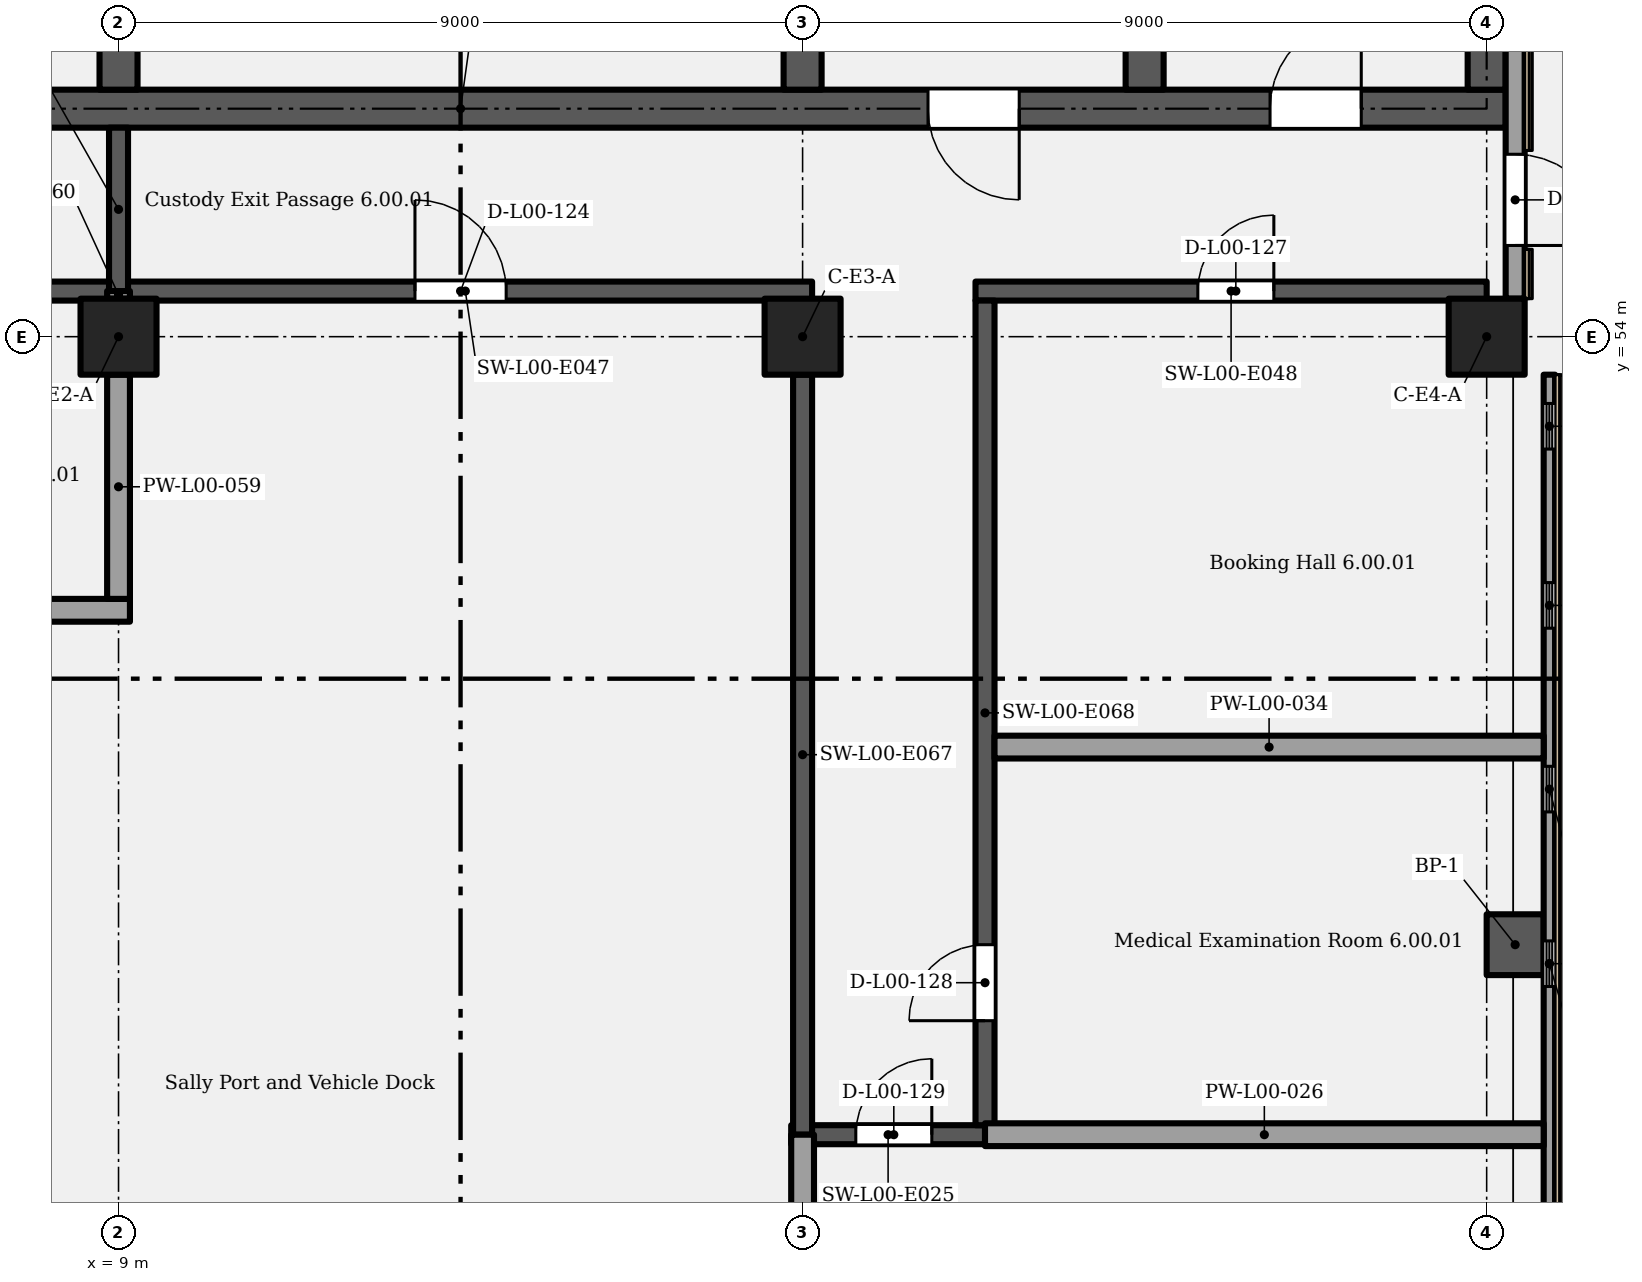
"""IFC4 building model, lengths in metres.
Left out: names, types, materials, properties, quantities, classifications, styles, units other than length and angle.
Written with IfcOpenShell. Run it as: python <this file> out.ifc"""

import sys

from ifc_helpers import new_model, si_unit, direction, frame, frame_2d, origin, origin_2d, place, context, subcontext, project, spatial, rectangle, extrude, element, fill, save


model = new_model("IFC4")
c1 = context("Model", 3, precision=1e-05, world=origin(), true_north=direction((0.0, 1.0)))
c2 = subcontext(c1, "Body", "Model", "MODEL_VIEW")
j1 = project(units=[si_unit("LENGTHUNIT", "METRE"), si_unit("PLANEANGLEUNIT", "RADIAN")], contexts=[c1])
p1 = place(None, origin())
s1 = spatial("IfcSite", under=j1, at=p1, CompositionType="ELEMENT")
p2 = place(p1, origin())
s2 = spatial("IfcBuilding", under=s1, at=p2, CompositionType="ELEMENT")
p3 = place(p2, origin())
s3 = spatial("IfcBuildingStorey", under=s2, at=p3, CompositionType="ELEMENT", Elevation=0.0)
for number, where, z_axis, x_axis in (
    (1, (9.0, 54.0, 0.0), (0.0, 0.0, 1.0), (1.0, 0.0, 0.0)),
    (2, (18.0, 54.0, 0.0), (0.0, 0.0, 1.0), (1.0, 0.0, 0.0)),
    (3, (27.0, 54.0, 0.0), (0.0, 0.0, 1.0), (1.0, 0.0, 0.0)),
):
    element("IfcColumn", number, at=place(p3, frame(where, z_axis=z_axis, x_axis=x_axis)), inside=s3, PredefinedType="COLUMN", context=c2, shape_type="SweptSolid", body=[
        extrude(rectangle(XDim=1.0, YDim=1.0, at=origin_2d()), origin(), (0.0, 0.0, 1.0), 6.6),
    ])
p4 = place(p3, frame((-0.25, 57.0, 0.0), z_axis=(0.0, 0.0, 1.0), x_axis=(1.0, 0.0, 0.0)))
e4 = element("IfcWall", 4, at=p4, inside=s3, PredefinedType="SHEAR", context=c2, shape_type="SweptSolid", body=[
    extrude(rectangle(XDim=27.5, YDim=0.5, at=frame_2d((13.75, 0.0))), origin(), (0.0, 0.0, 1.0), 6.3),
])
p5 = place(p4, frame((1.9, 0.0, 0.0)))
e5 = element("IfcOpeningElement", 5, at=p5, cuts=e4, PredefinedType="OPENING", context=c2, shape_type="SweptSolid", body=[
    extrude(rectangle(XDim=1.2, YDim=2.1, at=frame_2d((0.6, 1.05))), frame((0.0, 0.26, 0.0), z_axis=(0.0, -1.0, 0.0), x_axis=(1.0, 0.0, 0.0)), (0.0, 0.0, 1.0), 0.52),
])
p6 = place(p4, frame((7.6, 0.0, 0.0), z_axis=(0.0, 0.0, 1.0), x_axis=(-1.0, 0.0, 0.0)))
e6 = element("IfcOpeningElement", 6, at=p6, cuts=e4, PredefinedType="OPENING", context=c2, shape_type="SweptSolid", body=[
    extrude(rectangle(XDim=1.2, YDim=2.1, at=frame_2d((0.6, 1.05))), frame((0.0, 0.26, 0.0), z_axis=(0.0, -1.0, 0.0), x_axis=(1.0, 0.0, 0.0)), (0.0, 0.0, 1.0), 0.52),
])
p7 = place(p4, frame((21.1, 0.0, 0.0), z_axis=(0.0, 0.0, 1.0), x_axis=(-1.0, 0.0, 0.0)))
e7 = element("IfcOpeningElement", 7, at=p7, cuts=e4, PredefinedType="OPENING", context=c2, shape_type="SweptSolid", body=[
    extrude(rectangle(XDim=1.2, YDim=2.1, at=frame_2d((0.6, 1.05))), frame((0.0, 0.26, 0.0), z_axis=(0.0, -1.0, 0.0), x_axis=(1.0, 0.0, 0.0)), (0.0, 0.0, 1.0), 0.52),
])
p8 = place(p4, frame((24.4, 0.0, 0.0)))
e8 = element("IfcOpeningElement", 8, at=p8, cuts=e4, PredefinedType="OPENING", context=c2, shape_type="SweptSolid", body=[
    extrude(rectangle(XDim=1.2, YDim=2.1, at=frame_2d((0.6, 1.05))), frame((0.0, 0.26, 0.0), z_axis=(0.0, -1.0, 0.0), x_axis=(1.0, 0.0, 0.0)), (0.0, 0.0, 1.0), 0.52),
])
for number, where, z_axis, x_axis in (
    (9, (9.0, 57.25, 0.0), (0.0, 0.0, 1.0), (0.0, 1.0, 0.0)),
    (10, (18.0, 57.25, 0.0), (0.0, 0.0, 1.0), (0.0, 1.0, 0.0)),
):
    element("IfcWall", number, at=place(p3, frame(where, z_axis=z_axis, x_axis=x_axis)), inside=s3, PredefinedType="SHEAR", context=c2, shape_type="SweptSolid", body=[
        extrude(rectangle(XDim=8.3, YDim=0.5, at=frame_2d((4.15, 0.0))), origin(), (0.0, 0.0, 1.0), 6.3),
    ])
p9 = place(p3, frame((22.5, 57.25, 0.0), z_axis=(0.0, 0.0, 1.0), x_axis=(0.0, 1.0, 0.0)))
e11 = element("IfcWall", 11, at=p9, inside=s3, PredefinedType="SHEAR", context=c2, shape_type="SweptSolid", body=[
    extrude(rectangle(XDim=8.5, YDim=0.5, at=frame_2d((4.25, 0.0))), origin(), (0.0, 0.0, 1.0), 6.3),
])
p10 = place(p9, frame((1.85, 0.0, 0.0), z_axis=(0.0, 0.0, 1.0), x_axis=(-1.0, 0.0, 0.0)))
e12 = element("IfcOpeningElement", 12, at=p10, cuts=e11, PredefinedType="OPENING", context=c2, shape_type="SweptSolid", body=[
    extrude(rectangle(XDim=1.2, YDim=2.1, at=frame_2d((0.6, 1.05))), frame((0.0, 0.26, 0.0), z_axis=(0.0, -1.0, 0.0), x_axis=(1.0, 0.0, 0.0)), (0.0, 0.0, 1.0), 0.52),
])
p11 = place(p3, frame((27.0, 57.25, 0.0), z_axis=(0.0, 0.0, 1.0), x_axis=(0.0, 1.0, 0.0)))
e13 = element("IfcWall", 13, at=p11, inside=s3, PredefinedType="SHEAR", context=c2, shape_type="SweptSolid", body=[
    extrude(rectangle(XDim=8.3, YDim=0.5, at=frame_2d((4.15, 0.0))), origin(), (0.0, 0.0, 1.0), 6.3),
])
p12 = place(p3, frame((27.375, 45.6, 0.0), z_axis=(0.0, 0.0, 1.0), x_axis=(0.0, 1.0, 0.0)))
e14 = element("IfcWall", 14, at=p12, inside=s3, PredefinedType="SOLIDWALL", context=c2, shape_type="SweptSolid", body=[
    extrude(rectangle(XDim=0.8, YDim=0.75, at=frame_2d((0.4, 0.0))), origin(), (0.0, 0.0, 1.0), 5.8),
])
p13 = place(p3, frame((27.825, 38.0, 0.0), z_axis=(0.0, 0.0, 1.0), x_axis=(0.0, 1.0, 0.0)))
e15 = element("IfcWall", 15, at=p13, inside=s3, PredefinedType="SOLIDWALL", context=c2, shape_type="SweptSolid", body=[
    extrude(rectangle(XDim=15.5, YDim=0.15, at=frame_2d((7.75, 0.0))), origin(), (0.0, 0.0, 1.0), 6.4),
])
p14 = place(p13, frame((0.379, 0.0, 1.5)))
e16 = element("IfcOpeningElement", 16, at=p14, cuts=e15, PredefinedType="OPENING", context=c2, shape_type="SweptSolid", body=[
    extrude(rectangle(XDim=0.6, YDim=3.0, at=frame_2d((0.3, 1.5))), frame((0.0, 0.085, 0.0), z_axis=(0.0, -1.0, 0.0), x_axis=(1.0, 0.0, 0.0)), (0.0, 0.0, 1.0), 0.17),
])
p15 = place(p13, frame((2.736, 0.0, 1.5)))
e17 = element("IfcOpeningElement", 17, at=p15, cuts=e15, PredefinedType="OPENING", context=c2, shape_type="SweptSolid", body=[
    extrude(rectangle(XDim=0.6, YDim=3.0, at=frame_2d((0.3, 1.5))), frame((0.0, 0.085, 0.0), z_axis=(0.0, -1.0, 0.0), x_axis=(1.0, 0.0, 0.0)), (0.0, 0.0, 1.0), 0.17),
])
p16 = place(p13, frame((7.45, 0.0, 1.5)))
e18 = element("IfcOpeningElement", 18, at=p16, cuts=e15, PredefinedType="OPENING", context=c2, shape_type="SweptSolid", body=[
    extrude(rectangle(XDim=0.6, YDim=3.0, at=frame_2d((0.3, 1.5))), frame((0.0, 0.085, 0.0), z_axis=(0.0, -1.0, 0.0), x_axis=(1.0, 0.0, 0.0)), (0.0, 0.0, 1.0), 0.17),
])
p17 = place(p13, frame((9.747, 0.0, 1.5)))
e19 = element("IfcOpeningElement", 19, at=p17, cuts=e15, PredefinedType="OPENING", context=c2, shape_type="SweptSolid", body=[
    extrude(rectangle(XDim=0.6, YDim=3.0, at=frame_2d((0.3, 1.5))), frame((0.0, 0.085, 0.0), z_axis=(0.0, -1.0, 0.0), x_axis=(1.0, 0.0, 0.0)), (0.0, 0.0, 1.0), 0.17),
])
p18 = place(p13, frame((12.164, 0.0, 1.5)))
e20 = element("IfcOpeningElement", 20, at=p18, cuts=e15, PredefinedType="OPENING", context=c2, shape_type="SweptSolid", body=[
    extrude(rectangle(XDim=0.6, YDim=3.0, at=frame_2d((0.3, 1.5))), frame((0.0, 0.085, 0.0), z_axis=(0.0, -1.0, 0.0), x_axis=(1.0, 0.0, 0.0)), (0.0, 0.0, 1.0), 0.17),
])
p19 = place(p13, frame((14.521, 0.0, 1.5)))
e21 = element("IfcOpeningElement", 21, at=p19, cuts=e15, PredefinedType="OPENING", context=c2, shape_type="SweptSolid", body=[
    extrude(rectangle(XDim=0.6, YDim=3.0, at=frame_2d((0.3, 1.5))), frame((0.0, 0.085, 0.0), z_axis=(0.0, -1.0, 0.0), x_axis=(1.0, 0.0, 0.0)), (0.0, 0.0, 1.0), 0.17),
])
p20 = place(p3, frame((27.375, 54.5, 0.0), z_axis=(0.0, 0.0, 1.0), x_axis=(0.0, 1.0, 0.0)))
e22 = element("IfcWall", 22, at=p20, inside=s3, PredefinedType="SOLIDWALL", context=c2, shape_type="SweptSolid", body=[
    extrude(rectangle(XDim=11.05, YDim=0.25, at=frame_2d((5.525, 0.0))), origin(), (0.0, 0.0, 1.0), 6.3),
])
p21 = place(p20, frame((1.9, 0.0, 0.0), z_axis=(0.0, 0.0, 1.0), x_axis=(-1.0, 0.0, 0.0)))
e23 = element("IfcOpeningElement", 23, at=p21, cuts=e22, PredefinedType="OPENING", context=c2, shape_type="SweptSolid", body=[
    extrude(rectangle(XDim=1.2, YDim=2.1, at=frame_2d((0.6, 1.05))), frame((0.0, 0.135, 0.0), z_axis=(0.0, -1.0, 0.0), x_axis=(1.0, 0.0, 0.0)), (0.0, 0.0, 1.0), 0.27),
])
p22 = place(p3, frame((17.85, 43.5, 0.0), z_axis=(0.0, 0.0, 1.0), x_axis=(1.0, 0.0, 0.0)))
e24 = element("IfcWall", 24, at=p22, inside=s3, PredefinedType="SHEAR", context=c2, shape_type="SweptSolid", body=[
    extrude(rectangle(XDim=2.55, YDim=0.25, at=frame_2d((1.275, 0.0))), origin(), (0.0, 0.0, 1.0), 6.3),
])
p23 = place(p22, frame((0.85, 0.0, 0.0)))
e25 = element("IfcOpeningElement", 25, at=p23, cuts=e24, PredefinedType="OPENING", context=c2, shape_type="SweptSolid", body=[
    extrude(rectangle(XDim=1.0, YDim=2.1, at=frame_2d((0.5, 1.05))), frame((0.0, 0.135, 0.0), z_axis=(0.0, -1.0, 0.0), x_axis=(1.0, 0.0, 0.0)), (0.0, 0.0, 1.0), 0.27),
])
p24 = place(p3, frame((20.4, 43.5, 0.0), z_axis=(0.0, 0.0, 1.0), x_axis=(1.0, 0.0, 0.0)))
e26 = element("IfcWall", 26, at=p24, inside=s3, PredefinedType="PARTITIONING", context=c2, shape_type="SweptSolid", body=[
    extrude(rectangle(XDim=7.35, YDim=0.3, at=frame_2d((3.675, 0.0))), origin(), (0.0, 0.0, 1.0), 6.3),
])
p25 = place(p3, frame((20.525, 48.6, 0.0), z_axis=(0.0, 0.0, 1.0), x_axis=(1.0, 0.0, 0.0)))
e27 = element("IfcWall", 27, at=p25, inside=s3, PredefinedType="PARTITIONING", context=c2, shape_type="SweptSolid", body=[
    extrude(rectangle(XDim=7.225, YDim=0.3, at=frame_2d((3.613, 0.0))), origin(), (0.0, 0.0, 1.0), 6.3),
])
p26 = place(p3, frame((0.0, 50.4, 0.0), z_axis=(0.0, 0.0, 1.0), x_axis=(1.0, 0.0, 0.0)))
e28 = element("IfcWall", 28, at=p26, inside=s3, PredefinedType="PARTITIONING", context=c2, shape_type="SweptSolid", body=[
    extrude(rectangle(XDim=9.15, YDim=0.3, at=frame_2d((4.575, 0.0))), origin(), (0.0, 0.0, 1.0), 6.3),
])
p27 = place(p3, frame((0.0, 54.6, 0.0), z_axis=(0.0, 0.0, 1.0), x_axis=(1.0, 0.0, 0.0)))
e29 = element("IfcWall", 29, at=p27, inside=s3, PredefinedType="SHEAR", context=c2, shape_type="SweptSolid", body=[
    extrude(rectangle(XDim=9.0, YDim=0.25, at=frame_2d((4.5, 0.0))), origin(), (0.0, 0.0, 1.0), 6.3),
])
p28 = place(p27, frame((3.9, 0.0, 0.0)))
e30 = element("IfcOpeningElement", 30, at=p28, cuts=e29, PredefinedType="OPENING", context=c2, shape_type="SweptSolid", body=[
    extrude(rectangle(XDim=1.2, YDim=2.1, at=frame_2d((0.6, 1.05))), frame((0.0, 0.135, 0.0), z_axis=(0.0, -1.0, 0.0), x_axis=(1.0, 0.0, 0.0)), (0.0, 0.0, 1.0), 0.27),
])
p29 = place(p3, frame((9.0, 54.6, 0.0), z_axis=(0.0, 0.0, 1.0), x_axis=(1.0, 0.0, 0.0)))
e31 = element("IfcWall", 31, at=p29, inside=s3, PredefinedType="SHEAR", context=c2, shape_type="SweptSolid", body=[
    extrude(rectangle(XDim=9.125, YDim=0.25, at=frame_2d((4.562, 0.0))), origin(), (0.0, 0.0, 1.0), 6.3),
])
p30 = place(p29, frame((3.9, 0.0, 0.0)))
e32 = element("IfcOpeningElement", 32, at=p30, cuts=e31, PredefinedType="OPENING", context=c2, shape_type="SweptSolid", body=[
    extrude(rectangle(XDim=1.2, YDim=2.1, at=frame_2d((0.6, 1.05))), frame((0.0, 0.135, 0.0), z_axis=(0.0, -1.0, 0.0), x_axis=(1.0, 0.0, 0.0)), (0.0, 0.0, 1.0), 0.27),
])
p31 = place(p3, frame((20.275, 54.6, 0.0), z_axis=(0.0, 0.0, 1.0), x_axis=(1.0, 0.0, 0.0)))
e33 = element("IfcWall", 33, at=p31, inside=s3, PredefinedType="SHEAR", context=c2, shape_type="SweptSolid", body=[
    extrude(rectangle(XDim=6.725, YDim=0.25, at=frame_2d((3.363, 0.0))), origin(), (0.0, 0.0, 1.0), 6.3),
])
p32 = place(p31, frame((2.925, 0.0, 0.0)))
e34 = element("IfcOpeningElement", 34, at=p32, cuts=e33, PredefinedType="OPENING", context=c2, shape_type="SweptSolid", body=[
    extrude(rectangle(XDim=1.0, YDim=2.1, at=frame_2d((0.5, 1.05))), frame((0.0, 0.135, 0.0), z_axis=(0.0, -1.0, 0.0), x_axis=(1.0, 0.0, 0.0)), (0.0, 0.0, 1.0), 0.27),
])
p33 = place(p3, frame((9.0, 50.55, 0.0), z_axis=(0.0, 0.0, 1.0), x_axis=(0.0, 1.0, 0.0)))
e35 = element("IfcWall", 35, at=p33, inside=s3, PredefinedType="PARTITIONING", context=c2, shape_type="SweptSolid", body=[
    extrude(rectangle(XDim=2.95, YDim=0.3, at=frame_2d((1.475, 0.0))), origin(), (0.0, 0.0, 1.0), 5.35),
])
p34 = place(p3, frame((9.0, 54.5, 0.0), z_axis=(0.0, 0.0, 1.0), x_axis=(0.0, 1.0, 0.0)))
e36 = element("IfcWall", 36, at=p34, inside=s3, PredefinedType="PARTITIONING", context=c2, shape_type="SweptSolid", body=[
    extrude(rectangle(XDim=0.1, YDim=0.3, at=frame_2d((0.05, 0.0))), origin(), (0.0, 0.0, 1.0), 6.3),
])
p35 = place(p3, frame((9.0, 54.6, 0.0), z_axis=(0.0, 0.0, 1.0), x_axis=(0.0, 1.0, 0.0)))
e37 = element("IfcWall", 37, at=p35, inside=s3, PredefinedType="SHEAR", context=c2, shape_type="SweptSolid", body=[
    extrude(rectangle(XDim=2.15, YDim=0.25, at=frame_2d((1.075, 0.0))), origin(), (0.0, 0.0, 1.0), 6.3),
])
p36 = place(p3, frame((18.0, 38.0, 0.0), z_axis=(0.0, 0.0, 1.0), x_axis=(0.0, 1.0, 0.0)))
e38 = element("IfcWall", 38, at=p36, inside=s3, PredefinedType="PARTITIONING", context=c2, shape_type="SweptSolid", body=[
    extrude(rectangle(XDim=5.5, YDim=0.3, at=frame_2d((2.75, 0.0))), origin(), (0.0, 0.0, 1.0), 5.35),
])
p37 = place(p3, frame((18.0, 43.5, 0.0), z_axis=(0.0, 0.0, 1.0), x_axis=(0.0, 1.0, 0.0)))
e39 = element("IfcWall", 39, at=p37, inside=s3, PredefinedType="SHEAR", context=c2, shape_type="SweptSolid", body=[
    extrude(rectangle(XDim=10.0, YDim=0.25, at=frame_2d((5.0, 0.0))), origin(), (0.0, 0.0, 1.0), 6.3),
])
p38 = place(p3, frame((20.4, 43.625, 0.0), z_axis=(0.0, 0.0, 1.0), x_axis=(0.0, 1.0, 0.0)))
e40 = element("IfcWall", 40, at=p38, inside=s3, PredefinedType="SHEAR", context=c2, shape_type="SweptSolid", body=[
    extrude(rectangle(XDim=10.85, YDim=0.25, at=frame_2d((5.425, 0.0))), origin(), (0.0, 0.0, 1.0), 6.3),
])
p39 = place(p38, frame((1.375, 0.0, 0.0)))
e41 = element("IfcOpeningElement", 41, at=p39, cuts=e40, PredefinedType="OPENING", context=c2, shape_type="SweptSolid", body=[
    extrude(rectangle(XDim=1.0, YDim=2.1, at=frame_2d((0.5, 1.05))), frame((0.0, 0.135, 0.0), z_axis=(0.0, -1.0, 0.0), x_axis=(1.0, 0.0, 0.0)), (0.0, 0.0, 1.0), 0.27),
])
p40 = place(p16, origin())
e42 = element("IfcWindow", 42, at=p40, inside=s3, PartitioningType="SINGLE_PANEL", PredefinedType="WINDOW", context=c2, shape_type="SweptSolid", body=[
    extrude(rectangle(XDim=0.6, YDim=3.0, at=frame_2d((0.3, 1.5))), frame((0.0, 0.03, 0.0), z_axis=(0.0, -1.0, 0.0), x_axis=(1.0, 0.0, 0.0)), (0.0, 0.0, 1.0), 0.06),
])
fill(e18, e42)
p41 = place(p17, origin())
e43 = element("IfcWindow", 43, at=p41, inside=s3, PartitioningType="SINGLE_PANEL", PredefinedType="WINDOW", context=c2, shape_type="SweptSolid", body=[
    extrude(rectangle(XDim=0.6, YDim=3.0, at=frame_2d((0.3, 1.5))), frame((0.0, 0.03, 0.0), z_axis=(0.0, -1.0, 0.0), x_axis=(1.0, 0.0, 0.0)), (0.0, 0.0, 1.0), 0.06),
])
fill(e19, e43)
p42 = place(p18, origin())
e44 = element("IfcWindow", 44, at=p42, inside=s3, PartitioningType="SINGLE_PANEL", PredefinedType="WINDOW", context=c2, shape_type="SweptSolid", body=[
    extrude(rectangle(XDim=0.6, YDim=3.0, at=frame_2d((0.3, 1.5))), frame((0.0, 0.03, 0.0), z_axis=(0.0, -1.0, 0.0), x_axis=(1.0, 0.0, 0.0)), (0.0, 0.0, 1.0), 0.06),
])
fill(e20, e44)
p43 = place(p19, origin())
e45 = element("IfcWindow", 45, at=p43, inside=s3, PartitioningType="SINGLE_PANEL", PredefinedType="WINDOW", context=c2, shape_type="SweptSolid", body=[
    extrude(rectangle(XDim=0.6, YDim=3.0, at=frame_2d((0.3, 1.5))), frame((0.0, 0.03, 0.0), z_axis=(0.0, -1.0, 0.0), x_axis=(1.0, 0.0, 0.0)), (0.0, 0.0, 1.0), 0.06),
])
fill(e21, e45)
p44 = place(p21, origin())
e46 = element("IfcDoor", 46, at=p44, inside=s3, OperationType="SINGLE_SWING_LEFT", PredefinedType="DOOR", context=c2, shape_type="SweptSolid", body=[
    extrude(rectangle(XDim=1.2, YDim=2.1, at=frame_2d((0.6, 1.05))), frame((0.0, 0.025, 0.0), z_axis=(0.0, -1.0, 0.0), x_axis=(1.0, 0.0, 0.0)), (0.0, 0.0, 1.0), 0.05),
])
fill(e23, e46)
p45 = place(p7, origin())
e47 = element("IfcDoor", 47, at=p45, inside=s3, OperationType="SINGLE_SWING_LEFT", PredefinedType="DOOR", context=c2, shape_type="SweptSolid", body=[
    extrude(rectangle(XDim=1.2, YDim=2.1, at=frame_2d((0.6, 1.05))), frame((0.0, 0.025, 0.0), z_axis=(0.0, -1.0, 0.0), x_axis=(1.0, 0.0, 0.0)), (0.0, 0.0, 1.0), 0.05),
])
fill(e7, e47)
p46 = place(p8, origin())
e48 = element("IfcDoor", 48, at=p46, inside=s3, OperationType="SINGLE_SWING_RIGHT", PredefinedType="DOOR", context=c2, shape_type="SweptSolid", body=[
    extrude(rectangle(XDim=1.2, YDim=2.1, at=frame_2d((0.6, 1.05))), frame((0.0, 0.025, 0.0), z_axis=(0.0, -1.0, 0.0), x_axis=(1.0, 0.0, 0.0)), (0.0, 0.0, 1.0), 0.05),
])
fill(e8, e48)
p47 = place(p30, origin())
e49 = element("IfcDoor", 49, at=p47, inside=s3, OperationType="SINGLE_SWING_LEFT", PredefinedType="DOOR", context=c2, shape_type="SweptSolid", body=[
    extrude(rectangle(XDim=1.2, YDim=2.1, at=frame_2d((0.6, 1.05))), frame((0.0, 0.025, 0.0), z_axis=(0.0, -1.0, 0.0), x_axis=(1.0, 0.0, 0.0)), (0.0, 0.0, 1.0), 0.05),
])
fill(e32, e49)
p48 = place(p32, origin())
e50 = element("IfcDoor", 50, at=p48, inside=s3, OperationType="SINGLE_SWING_RIGHT", PredefinedType="DOOR", context=c2, shape_type="SweptSolid", body=[
    extrude(rectangle(XDim=1.0, YDim=2.1, at=frame_2d((0.5, 1.05))), frame((0.0, 0.025, 0.0), z_axis=(0.0, -1.0, 0.0), x_axis=(1.0, 0.0, 0.0)), (0.0, 0.0, 1.0), 0.05),
])
fill(e34, e50)
p49 = place(p39, origin())
e51 = element("IfcDoor", 51, at=p49, inside=s3, OperationType="SINGLE_SWING_LEFT", PredefinedType="DOOR", context=c2, shape_type="SweptSolid", body=[
    extrude(rectangle(XDim=1.0, YDim=2.1, at=frame_2d((0.5, 1.05))), frame((0.0, 0.025, 0.0), z_axis=(0.0, -1.0, 0.0), x_axis=(1.0, 0.0, 0.0)), (0.0, 0.0, 1.0), 0.05),
])
fill(e41, e51)
p50 = place(p23, origin())
e52 = element("IfcDoor", 52, at=p50, inside=s3, OperationType="SINGLE_SWING_RIGHT", PredefinedType="DOOR", context=c2, shape_type="SweptSolid", body=[
    extrude(rectangle(XDim=1.0, YDim=2.1, at=frame_2d((0.5, 1.05))), frame((0.0, 0.025, 0.0), z_axis=(0.0, -1.0, 0.0), x_axis=(1.0, 0.0, 0.0)), (0.0, 0.0, 1.0), 0.05),
])
fill(e25, e52)
save(model, sys.argv[1])
